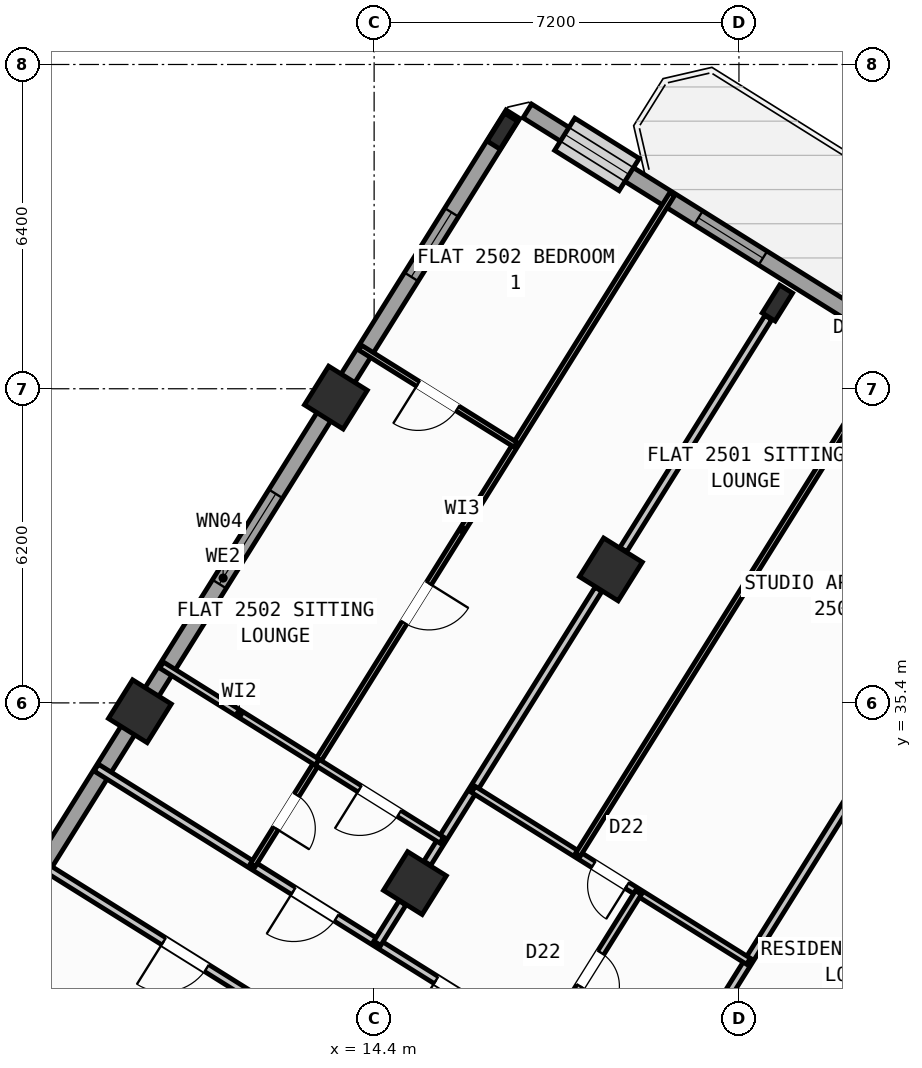
"""IFC4 building model, lengths in metres.
Left out: names, types, materials, properties, quantities, classifications, styles, units other than length and angle.
Written with IfcOpenShell. Run it as: python <this file> out.ifc"""

import sys

from ifc_helpers import new_model, si_unit, direction, frame, frame_2d, origin, origin_2d, place, context, subcontext, project, spatial, rectangle, hollow_rectangle, i_section, extrude, source, transform, mapped, element, fill, save


model = new_model("IFC4")
c1 = context("Model", 3, precision=1e-05, world=origin(), true_north=direction((0.0, 1.0)))
c2 = subcontext(c1, "Body", "Model", "MODEL_VIEW")
j1 = project(units=[si_unit("LENGTHUNIT", "METRE"), si_unit("PLANEANGLEUNIT", "RADIAN")], contexts=[c1])
p1 = place(None, origin())
s1 = spatial("IfcSite", under=j1, at=p1, CompositionType="ELEMENT")
p2 = place(p1, origin())
s2 = spatial("IfcBuilding", under=s1, at=p2, CompositionType="ELEMENT")
p3 = place(p2, frame((0.0, 0.0, 100.8)))
s3 = spatial("IfcBuildingStorey", under=s2, at=p3, CompositionType="ELEMENT", Elevation=100.8)
m1 = source(origin(), c2, "Body", "SweptSolid", [
    extrude(i_section(OverallWidth=0.3, OverallDepth=0.65, WebThickness=0.016, FlangeThickness=0.031, at=origin_2d()), origin(), (0.0, 0.0, 1.0), 4.5),
])
p4 = place(p3, frame((22.358, 43.292, 0.0), z_axis=(0.0, 0.0, 1.0), x_axis=(-0.848048096156, 0.529919264233, 0.0)))
e1 = element("IfcColumn", 1, at=p4, inside=s3, PredefinedType="COLUMN", context=c2, shape_type="MappedRepresentation", body=[
    mapped(m1, transform((0.0, 0.0, 0.0), scale=1.0)),
])
m2 = source(origin(), c2, "Body", "SweptSolid", [
    extrude(hollow_rectangle(XDim=0.9, YDim=0.9, WallThickness=0.036, at=origin_2d()), origin(), (0.0, 0.0, 1.0), 4.5),
])
for number, where, z_axis, x_axis in (
    (2, (19.073, 38.034, 0.0), (0.0, 0.0, 1.0), (-0.848, 0.53, 0.0)),
    (3, (15.205, 31.844, 0.0), (0.0, 0.0, 1.0), (-0.848, 0.53, 0.0)),
):
    element("IfcColumn", number, at=place(p3, frame(where, z_axis=z_axis, x_axis=x_axis)), inside=s3, PredefinedType="COLUMN", context=c2, shape_type="MappedRepresentation", body=[
        mapped(m2, transform((0.0, 0.0, 0.0), scale=1.0)),
    ])
p5 = place(p3, frame((16.931, 46.684, 0.0), z_axis=(0.0, 0.0, 1.0), x_axis=(-0.848048096156, 0.529919264233, 0.0)))
e4 = element("IfcColumn", 4, at=p5, inside=s3, PredefinedType="COLUMN", context=c2, shape_type="MappedRepresentation", body=[
    mapped(m1, transform((0.0, 0.0, 0.0), scale=1.0)),
])
for number, where, z_axis, x_axis in (
    (5, (13.646, 41.426, 0.0), (0.0, 0.0, 1.0), (-0.848, 0.53, 0.0)),
    (6, (9.777, 35.235, 0.0), (0.0, 0.0, 1.0), (-0.848, 0.53, 0.0)),
):
    element("IfcColumn", number, at=place(p3, frame(where, z_axis=z_axis, x_axis=x_axis)), inside=s3, PredefinedType="COLUMN", context=c2, shape_type="MappedRepresentation", body=[
        mapped(m2, transform((0.0, 0.0, 0.0), scale=1.0)),
    ])
p6 = place(p3, frame((5.7, 28.71, 0.0), z_axis=(0.0, 0.0, 1.0), x_axis=(0.529923711467, 0.8480453172, 0.0)))
e7 = element("IfcWall", 7, at=p6, inside=s3, PredefinedType="STANDARD", context=c2, shape_type="SweptSolid", body=[
    extrude(rectangle(XDim=21.587, YDim=0.32, at=frame_2d((10.794, 0.0))), origin(), (0.0, 0.0, 1.0), 3.675),
])
p7 = place(p6, frame((1.629, 0.0, 0.85)))
e8 = element("IfcOpeningElement", 8, at=p7, cuts=e7, PredefinedType="OPENING", context=c2, shape_type="SweptSolid", body=[
    extrude(rectangle(XDim=1.5, YDim=1.5, at=frame_2d((0.75, 0.75))), frame((0.0, 0.17, 0.0), z_axis=(0.0, -1.0, 0.0), x_axis=(1.0, 0.0, 0.0)), (0.0, 0.0, 1.0), 0.34),
])
p8 = place(p6, frame((10.654, 0.0, 0.8)))
e9 = element("IfcOpeningElement", 9, at=p8, cuts=e7, PredefinedType="OPENING", context=c2, shape_type="SweptSolid", body=[
    extrude(rectangle(XDim=2.1, YDim=1.55, at=frame_2d((1.05, 0.775))), frame((0.0, 0.17, 0.0), z_axis=(0.0, -1.0, 0.0), x_axis=(1.0, 0.0, 0.0)), (0.0, 0.0, 1.0), 0.34),
])
p9 = place(p6, frame((17.803, 0.0, 0.85)))
e10 = element("IfcOpeningElement", 10, at=p9, cuts=e7, PredefinedType="OPENING", context=c2, shape_type="SweptSolid", body=[
    extrude(rectangle(XDim=1.5, YDim=1.5, at=frame_2d((0.75, 0.75))), frame((0.0, 0.17, 0.0), z_axis=(0.0, -1.0, 0.0), x_axis=(1.0, 0.0, 0.0)), (0.0, 0.0, 1.0), 0.34),
])
p10 = place(p3, frame((17.424, 47.083, 0.0), z_axis=(0.0, 0.0, 1.0), x_axis=(0.848049927979, -0.529916332693, 0.0)))
e11 = element("IfcWall", 11, at=p10, inside=s3, PredefinedType="STANDARD", context=c2, shape_type="SweptSolid", body=[
    extrude(rectangle(XDim=29.223, YDim=0.32, at=frame_2d((14.612, 0.0))), origin(), (0.0, 0.0, 1.0), 4.25),
])
p11 = place(p10, frame((10.072, 0.0, 0.0)))
e12 = element("IfcOpeningElement", 12, at=p11, cuts=e11, PredefinedType="OPENING", context=c2, shape_type="SweptSolid", body=[
    extrude(rectangle(XDim=1.05, YDim=2.15, at=frame_2d((0.525, 1.075))), frame((0.0, 0.17, 0.0), z_axis=(0.0, -1.0, 0.0), x_axis=(1.0, 0.0, 0.0)), (0.0, 0.0, 1.0), 0.34),
])
p12 = place(p10, frame((0.869, 0.0, 0.85)))
e13 = element("IfcOpeningElement", 13, at=p12, cuts=e11, PredefinedType="OPENING", context=c2, shape_type="SweptSolid", body=[
    extrude(rectangle(XDim=1.5, YDim=1.5, at=frame_2d((0.75, 0.75))), frame((0.0, 0.17, 0.0), z_axis=(0.0, -1.0, 0.0), x_axis=(1.0, 0.0, 0.0)), (0.0, 0.0, 1.0), 0.34),
])
p13 = place(p10, frame((3.981, 0.0, 0.85)))
e14 = element("IfcOpeningElement", 14, at=p13, cuts=e11, PredefinedType="OPENING", context=c2, shape_type="SweptSolid", body=[
    extrude(rectangle(XDim=1.5, YDim=1.5, at=frame_2d((0.75, 0.75))), frame((0.0, 0.17, 0.0), z_axis=(0.0, -1.0, 0.0), x_axis=(1.0, 0.0, 0.0)), (0.0, 0.0, 1.0), 0.34),
])
p14 = place(p10, frame((13.739, 0.0, 0.85)))
e15 = element("IfcOpeningElement", 15, at=p14, cuts=e11, PredefinedType="OPENING", context=c2, shape_type="SweptSolid", body=[
    extrude(rectangle(XDim=1.5, YDim=1.5, at=frame_2d((0.75, 0.75))), frame((0.0, 0.17, 0.0), z_axis=(0.0, -1.0, 0.0), x_axis=(1.0, 0.0, 0.0)), (0.0, 0.0, 1.0), 0.34),
])
p15 = place(p10, frame((21.114, 0.0, 0.65)))
e16 = element("IfcOpeningElement", 16, at=p15, cuts=e11, PredefinedType="OPENING", context=c2, shape_type="SweptSolid", body=[
    extrude(rectangle(XDim=2.8, YDim=2.1, at=frame_2d((1.4, 1.05))), frame((0.0, 0.17, 0.0), z_axis=(0.0, -1.0, 0.0), x_axis=(1.0, 0.0, 0.0)), (0.0, 0.0, 1.0), 0.34),
])
p16 = place(p10, frame((26.784, 0.0, 0.85)))
e17 = element("IfcOpeningElement", 17, at=p16, cuts=e11, PredefinedType="OPENING", context=c2, shape_type="SweptSolid", body=[
    extrude(rectangle(XDim=1.5, YDim=1.5, at=frame_2d((0.75, 0.75))), frame((0.0, 0.17, 0.0), z_axis=(0.0, -1.0, 0.0), x_axis=(1.0, 0.0, 0.0)), (0.0, 0.0, 1.0), 0.34),
])
p17 = place(p3, frame((31.239, 38.274, 0.0), z_axis=(0.0, 0.0, 1.0), x_axis=(-0.529918877109, -0.848048338059, 0.0)))
e18 = element("IfcWall", 18, at=p17, inside=s3, PredefinedType="PARTITIONING", context=c2, shape_type="SweptSolid", body=[
    extrude(rectangle(XDim=15.35, YDim=0.16, at=frame_2d((7.675, 0.0))), origin(), (0.0, 0.0, 1.0), 4.24),
])
p18 = place(p3, frame((23.104, 25.256, 0.0), z_axis=(0.0, 0.0, 1.0), x_axis=(-0.848041752158, 0.529929416617, 0.0)))
e19 = element("IfcWall", 19, at=p18, inside=s3, PredefinedType="PARTITIONING", context=c2, shape_type="SweptSolid", body=[
    extrude(rectangle(XDim=16.73, YDim=0.16, at=frame_2d((8.365, 0.0))), origin(), (0.0, 0.0, 1.0), 4.24),
])
p19 = place(p18, frame((1.395, 0.0, 0.0)))
e20 = element("IfcOpeningElement", 20, at=p19, cuts=e19, PredefinedType="OPENING", context=c2, shape_type="SweptSolid", body=[
    extrude(rectangle(XDim=1.0, YDim=2.1, at=frame_2d((0.5, 1.05))), frame((0.0, 0.09, 0.0), z_axis=(0.0, -1.0, 0.0), x_axis=(1.0, 0.0, 0.0)), (0.0, 0.0, 1.0), 0.18),
])
p20 = place(p18, frame((7.82, 0.0, 0.0)))
e21 = element("IfcOpeningElement", 21, at=p20, cuts=e19, PredefinedType="OPENING", context=c2, shape_type="SweptSolid", body=[
    extrude(rectangle(XDim=1.0, YDim=2.1, at=frame_2d((0.5, 1.05))), frame((0.0, 0.09, 0.0), z_axis=(0.0, -1.0, 0.0), x_axis=(1.0, 0.0, 0.0)), (0.0, 0.0, 1.0), 0.18),
])
p21 = place(p18, frame((11.14, 0.0, 0.0)))
e22 = element("IfcOpeningElement", 22, at=p21, cuts=e19, PredefinedType="OPENING", context=c2, shape_type="SweptSolid", body=[
    extrude(rectangle(XDim=1.0, YDim=2.1, at=frame_2d((0.5, 1.05))), frame((0.0, 0.09, 0.0), z_axis=(0.0, -1.0, 0.0), x_axis=(1.0, 0.0, 0.0)), (0.0, 0.0, 1.0), 0.18),
])
p22 = place(p3, frame((21.938, 23.391, 0.0), z_axis=(0.0, 0.0, 1.0), x_axis=(-0.848045850158, 0.529922858565, 0.0)))
e23 = element("IfcWall", 23, at=p22, inside=s3, PredefinedType="PARTITIONING", context=c2, shape_type="SweptSolid", body=[
    extrude(rectangle(XDim=16.73, YDim=0.16, at=frame_2d((8.365, 0.0))), origin(), (0.0, 0.0, 1.0), 4.24),
])
p23 = place(p22, frame((1.505, 0.0, 0.0)))
e24 = element("IfcOpeningElement", 24, at=p23, cuts=e23, PredefinedType="OPENING", context=c2, shape_type="SweptSolid", body=[
    extrude(rectangle(XDim=1.0, YDim=2.1, at=frame_2d((0.5, 1.05))), frame((0.0, 0.09, 0.0), z_axis=(0.0, -1.0, 0.0), x_axis=(1.0, 0.0, 0.0)), (0.0, 0.0, 1.0), 0.18),
])
p24 = place(p22, frame((6.435, 0.0, 0.0)))
e25 = element("IfcOpeningElement", 25, at=p24, cuts=e23, PredefinedType="OPENING", context=c2, shape_type="SweptSolid", body=[
    extrude(rectangle(XDim=1.0, YDim=2.1, at=frame_2d((0.5, 1.05))), frame((0.0, 0.09, 0.0), z_axis=(0.0, -1.0, 0.0), x_axis=(1.0, 0.0, 0.0)), (0.0, 0.0, 1.0), 0.18),
])
p25 = place(p22, frame((12.784, 0.0, 0.0)))
e26 = element("IfcOpeningElement", 26, at=p25, cuts=e23, PredefinedType="OPENING", context=c2, shape_type="SweptSolid", body=[
    extrude(rectangle(XDim=1.0, YDim=2.1, at=frame_2d((0.5, 1.05))), frame((0.0, 0.09, 0.0), z_axis=(0.0, -1.0, 0.0), x_axis=(1.0, 0.0, 0.0)), (0.0, 0.0, 1.0), 0.18),
])
p26 = place(p3, frame((24.256, 34.251, 0.0), z_axis=(0.0, 0.0, 1.0), x_axis=(-0.529919772691, -0.848047778437, 0.0)))
e27 = element("IfcWall", 27, at=p26, inside=s3, PredefinedType="PARTITIONING", context=c2, shape_type="SweptSolid", body=[
    extrude(rectangle(XDim=6.376, YDim=0.16, at=frame_2d((3.188, 0.0))), origin(), (0.0, 0.0, 1.0), 3.675),
])
p27 = place(p3, frame((22.18, 43.006, 0.0), z_axis=(0.0, 0.0, 1.0), x_axis=(-0.529913610495, -0.848051628978, 0.0)))
e28 = element("IfcWall", 28, at=p27, inside=s3, PredefinedType="PARTITIONING", context=c2, shape_type="SweptSolid", body=[
    extrude(rectangle(XDim=5.401, YDim=0.16, at=frame_2d((2.7, 0.0))), origin(), (0.0, 0.0, 1.0), 3.675),
])
p28 = place(p3, frame((18.828, 37.643, 0.0), z_axis=(0.0, 0.0, 1.0), x_axis=(-0.529930102756, -0.848041323399, 0.0)))
e29 = element("IfcWall", 29, at=p28, inside=s3, PredefinedType="PARTITIONING", context=c2, shape_type="SweptSolid", body=[
    extrude(rectangle(XDim=6.376, YDim=0.16, at=frame_2d((3.188, 0.0))), origin(), (0.0, 0.0, 1.0), 3.675),
])
p29 = place(p3, frame((14.96, 31.452, 0.0), z_axis=(0.0, 0.0, 1.0), x_axis=(-0.529952145338, -0.848027548876, 0.0)))
e30 = element("IfcWall", 30, at=p29, inside=s3, PredefinedType="PARTITIONING", context=c2, shape_type="SweptSolid", body=[
    extrude(rectangle(XDim=0.938, YDim=0.16, at=frame_2d((0.469, 0.0))), origin(), (0.0, 0.0, 1.0), 3.675),
])
p30 = place(p3, frame((21.787, 30.301, 0.0), z_axis=(0.0, 0.0, 1.0), x_axis=(-0.848049732085, 0.529916646191, 0.0)))
e31 = element("IfcWall", 31, at=p30, inside=s3, PredefinedType="PLUMBINGWALL", context=c2, shape_type="SweptSolid", body=[
    extrude(rectangle(XDim=6.4, YDim=0.14, at=frame_2d((3.2, 0.0))), origin(), (0.0, 0.0, 1.0), 4.24),
])
p31 = place(p30, frame((2.824, 0.0, 0.0)))
e32 = element("IfcOpeningElement", 32, at=p31, cuts=e31, PredefinedType="OPENING", context=c2, shape_type="SweptSolid", body=[
    extrude(rectangle(XDim=0.78, YDim=2.05, at=frame_2d((0.39, 1.025))), frame((0.0, 0.08, 0.0), z_axis=(0.0, -1.0, 0.0), x_axis=(1.0, 0.0, 0.0)), (0.0, 0.0, 1.0), 0.16),
])
p32 = place(p3, frame((19.616, 31.657, 0.0), z_axis=(0.0, 0.0, 1.0), x_axis=(-0.529876336437, -0.84807491891, 0.0)))
e33 = element("IfcWall", 33, at=p32, inside=s3, PredefinedType="PLUMBINGWALL", context=c2, shape_type="SweptSolid", body=[
    extrude(rectangle(XDim=3.58, YDim=0.14, at=frame_2d((1.79, 0.0))), origin(), (0.0, 0.0, 1.0), 4.24),
])
p33 = place(p32, frame((1.4, 0.0, 0.0)))
e34 = element("IfcOpeningElement", 34, at=p33, cuts=e33, PredefinedType="OPENING", context=c2, shape_type="SweptSolid", body=[
    extrude(rectangle(XDim=0.78, YDim=2.05, at=frame_2d((0.39, 1.025))), frame((0.0, 0.08, 0.0), z_axis=(0.0, -1.0, 0.0), x_axis=(1.0, 0.0, 0.0)), (0.0, 0.0, 1.0), 0.16),
])
p34 = place(p3, frame((24.802, 42.614, 0.0), z_axis=(0.0, 0.0, 1.0), x_axis=(-0.529929676091, -0.848041590017, 0.0)))
e35 = element("IfcWall", 35, at=p34, inside=s3, PredefinedType="PARTITIONING", context=c2, shape_type="SweptSolid", body=[
    extrude(rectangle(XDim=12.04, YDim=0.11, at=frame_2d((6.02, 0.0))), origin(), (0.0, 0.0, 1.0), 4.24),
])
p35 = place(p34, frame((0.47, 0.0, 0.0)))
e36 = element("IfcOpeningElement", 36, at=p35, cuts=e35, PredefinedType="OPENING", context=c2, shape_type="SweptSolid", body=[
    extrude(rectangle(XDim=0.92, YDim=2.08, at=frame_2d((0.46, 1.04))), frame((0.0, 0.065, 0.0), z_axis=(0.0, -1.0, 0.0), x_axis=(1.0, 0.0, 0.0)), (0.0, 0.0, 1.0), 0.13),
])
p36 = place(p3, frame((20.281, 45.44, 0.0), z_axis=(0.0, 0.0, 1.0), x_axis=(-0.529917451133, -0.848049229105, 0.0)))
e37 = element("IfcWall", 37, at=p36, inside=s3, PredefinedType="PARTITIONING", context=c2, shape_type="SweptSolid", body=[
    extrude(rectangle(XDim=15.62, YDim=0.11, at=frame_2d((7.81, 0.0))), origin(), (0.0, 0.0, 1.0), 4.24),
])
p37 = place(p36, frame((13.98, 0.0, 0.0)))
e38 = element("IfcOpeningElement", 38, at=p37, cuts=e37, PredefinedType="OPENING", context=c2, shape_type="SweptSolid", body=[
    extrude(rectangle(XDim=0.78, YDim=2.05, at=frame_2d((0.39, 1.025))), frame((0.0, 0.065, 0.0), z_axis=(0.0, -1.0, 0.0), x_axis=(1.0, 0.0, 0.0)), (0.0, 0.0, 1.0), 0.13),
])
p38 = place(p36, frame((9.055, 0.0, 0.0)))
e39 = element("IfcOpeningElement", 39, at=p38, cuts=e37, PredefinedType="OPENING", context=c2, shape_type="SweptSolid", body=[
    extrude(rectangle(XDim=0.92, YDim=2.08, at=frame_2d((0.46, 1.04))), frame((0.0, 0.065, 0.0), z_axis=(0.0, -1.0, 0.0), x_axis=(1.0, 0.0, 0.0)), (0.0, 0.0, 1.0), 0.13),
])
p39 = place(p3, frame((15.734, 32.692, 0.0), z_axis=(0.0, 0.0, 1.0), x_axis=(-0.848059786386, 0.529900555496, 0.0)))
e40 = element("IfcWall", 40, at=p39, inside=s3, PredefinedType="PLUMBINGWALL", context=c2, shape_type="SweptSolid", body=[
    extrude(rectangle(XDim=2.9, YDim=0.14, at=frame_2d((1.45, 0.0))), origin(), (0.0, 0.0, 1.0), 4.24),
])
p40 = place(p39, frame((0.99, 0.0, 0.0)))
e41 = element("IfcOpeningElement", 41, at=p40, cuts=e40, PredefinedType="OPENING", context=c2, shape_type="SweptSolid", body=[
    extrude(rectangle(XDim=0.92, YDim=2.08, at=frame_2d((0.46, 1.04))), frame((0.0, 0.08, 0.0), z_axis=(0.0, -1.0, 0.0), x_axis=(1.0, 0.0, 0.0)), (0.0, 0.0, 1.0), 0.16),
])
p41 = place(p3, frame((13.275, 34.228, 0.0), z_axis=(0.0, 0.0, 1.0), x_axis=(-0.848039976902, 0.529932257535, 0.0)))
e42 = element("IfcWall", 42, at=p41, inside=s3, PredefinedType="PLUMBINGWALL", context=c2, shape_type="SweptSolid", body=[
    extrude(rectangle(XDim=3.62, YDim=0.14, at=frame_2d((1.81, 0.0))), origin(), (0.0, 0.0, 1.0), 4.24),
])
p42 = place(p3, frame((17.191, 40.495, 0.0), z_axis=(0.0, 0.0, 1.0), x_axis=(-0.848051346257, 0.52991406295, 0.0)))
e43 = element("IfcWall", 43, at=p42, inside=s3, PredefinedType="PARTITIONING", context=c2, shape_type="SweptSolid", body=[
    extrude(rectangle(XDim=3.62, YDim=0.11, at=frame_2d((1.81, 0.0))), origin(), (0.0, 0.0, 1.0), 4.24),
])
p43 = place(p42, frame((1.35, 0.0, 0.0)))
e44 = element("IfcOpeningElement", 44, at=p43, cuts=e43, PredefinedType="OPENING", context=c2, shape_type="SweptSolid", body=[
    extrude(rectangle(XDim=0.92, YDim=2.08, at=frame_2d((0.46, 1.04))), frame((0.0, 0.065, 0.0), z_axis=(0.0, -1.0, 0.0), x_axis=(1.0, 0.0, 0.0)), (0.0, 0.0, 1.0), 0.13),
])
m3 = source(origin(), c2, "Body", "SweptSolid", [
    extrude(rectangle(XDim=2.1, YDim=1.55, at=frame_2d((1.05, 0.775))), frame((0.0, 0.03, 0.0), z_axis=(0.0, -1.0, 0.0), x_axis=(1.0, 0.0, 0.0)), (0.0, 0.0, 1.0), 0.06),
])
p44 = place(p8, origin())
e45 = element("IfcWindow", 45, at=p44, inside=s3, PartitioningType="SINGLE_PANEL", PredefinedType="WINDOW", context=c2, shape_type="MappedRepresentation", body=[
    mapped(m3, transform((0.0, 0.0, 0.0), scale=1.0)),
])
fill(e9, e45)
m4 = source(origin(), c2, "Body", "SweptSolid", [
    extrude(rectangle(XDim=1.5, YDim=1.5, at=frame_2d((0.75, 0.75))), frame((0.0, 0.03, 0.0), z_axis=(0.0, -1.0, 0.0), x_axis=(1.0, 0.0, 0.0)), (0.0, 0.0, 1.0), 0.06),
])
p45 = place(p9, origin())
e46 = element("IfcWindow", 46, at=p45, inside=s3, PartitioningType="SINGLE_PANEL", PredefinedType="WINDOW", context=c2, shape_type="MappedRepresentation", body=[
    mapped(m4, transform((0.0, 0.0, 0.0), scale=1.0)),
])
fill(e10, e46)
p46 = place(p12, origin())
e47 = element("IfcWindow", 47, at=p46, inside=s3, PartitioningType="SINGLE_PANEL", PredefinedType="WINDOW", context=c2, shape_type="MappedRepresentation", body=[
    mapped(m4, transform((0.0, 0.0, 0.0), scale=1.0)),
])
fill(e13, e47)
p47 = place(p13, origin())
e48 = element("IfcWindow", 48, at=p47, inside=s3, PartitioningType="SINGLE_PANEL", PredefinedType="WINDOW", context=c2, shape_type="MappedRepresentation", body=[
    mapped(m4, transform((0.0, 0.0, 0.0), scale=1.0)),
])
fill(e14, e48)
m5 = source(origin(), c2, "Body", "SweptSolid", [
    extrude(rectangle(XDim=1.0, YDim=2.1, at=frame_2d((0.5, 1.05))), frame((0.0, 0.025, 0.0), z_axis=(0.0, -1.0, 0.0), x_axis=(1.0, 0.0, 0.0)), (0.0, 0.0, 1.0), 0.05),
])
p48 = place(p25, origin())
e49 = element("IfcDoor", 49, at=p48, inside=s3, OperationType="SINGLE_SWING_RIGHT", PredefinedType="DOOR", context=c2, shape_type="MappedRepresentation", body=[
    mapped(m5, transform((0.0, 0.0, 0.0), scale=1.0)),
])
fill(e26, e49)
p49 = place(p20, origin())
e50 = element("IfcDoor", 50, at=p49, inside=s3, OperationType="SINGLE_SWING_RIGHT", PredefinedType="DOOR", context=c2, shape_type="MappedRepresentation", body=[
    mapped(m5, transform((0.0, 0.0, 0.0), scale=1.0)),
])
fill(e21, e50)
m6 = source(origin(), c2, "Body", "SweptSolid", [
    extrude(rectangle(XDim=0.78, YDim=2.05, at=frame_2d((0.39, 1.025))), frame((0.0, 0.025, 0.0), z_axis=(0.0, -1.0, 0.0), x_axis=(1.0, 0.0, 0.0)), (0.0, 0.0, 1.0), 0.05),
])
p50 = place(p31, origin())
e51 = element("IfcDoor", 51, at=p50, inside=s3, OperationType="SINGLE_SWING_LEFT", PredefinedType="DOOR", context=c2, shape_type="MappedRepresentation", body=[
    mapped(m6, transform((0.0, 0.0, 0.0), scale=1.0)),
])
fill(e32, e51)
p51 = place(p33, origin())
e52 = element("IfcDoor", 52, at=p51, inside=s3, OperationType="SINGLE_SWING_RIGHT", PredefinedType="DOOR", context=c2, shape_type="MappedRepresentation", body=[
    mapped(m6, transform((0.0, 0.0, 0.0), scale=1.0)),
])
fill(e34, e52)
p52 = place(p21, origin())
e53 = element("IfcDoor", 53, at=p52, inside=s3, OperationType="SINGLE_SWING_RIGHT", PredefinedType="DOOR", context=c2, shape_type="MappedRepresentation", body=[
    mapped(m5, transform((0.0, 0.0, 0.0), scale=1.0)),
])
fill(e22, e53)
m7 = source(origin(), c2, "Body", "SweptSolid", [
    extrude(rectangle(XDim=0.92, YDim=2.08, at=frame_2d((0.46, 1.04))), frame((0.0, 0.025, 0.0), z_axis=(0.0, -1.0, 0.0), x_axis=(1.0, 0.0, 0.0)), (0.0, 0.0, 1.0), 0.05),
])
p53 = place(p40, origin())
e54 = element("IfcDoor", 54, at=p53, inside=s3, OperationType="SINGLE_SWING_RIGHT", PredefinedType="DOOR", context=c2, shape_type="MappedRepresentation", body=[
    mapped(m7, transform((0.0, 0.0, 0.0), scale=1.0)),
])
fill(e41, e54)
p54 = place(p37, origin())
e55 = element("IfcDoor", 55, at=p54, inside=s3, OperationType="SINGLE_SWING_RIGHT", PredefinedType="DOOR", context=c2, shape_type="MappedRepresentation", body=[
    mapped(m6, transform((0.0, 0.0, 0.0), scale=1.0)),
])
fill(e38, e55)
p55 = place(p38, origin())
e56 = element("IfcDoor", 56, at=p55, inside=s3, OperationType="SINGLE_SWING_LEFT", PredefinedType="DOOR", context=c2, shape_type="MappedRepresentation", body=[
    mapped(m7, transform((0.0, 0.0, 0.0), scale=1.0)),
])
fill(e39, e56)
p56 = place(p43, origin())
e57 = element("IfcDoor", 57, at=p56, inside=s3, OperationType="SINGLE_SWING_RIGHT", PredefinedType="DOOR", context=c2, shape_type="MappedRepresentation", body=[
    mapped(m7, transform((0.0, 0.0, 0.0), scale=1.0)),
])
fill(e44, e57)
save(model, sys.argv[1])
